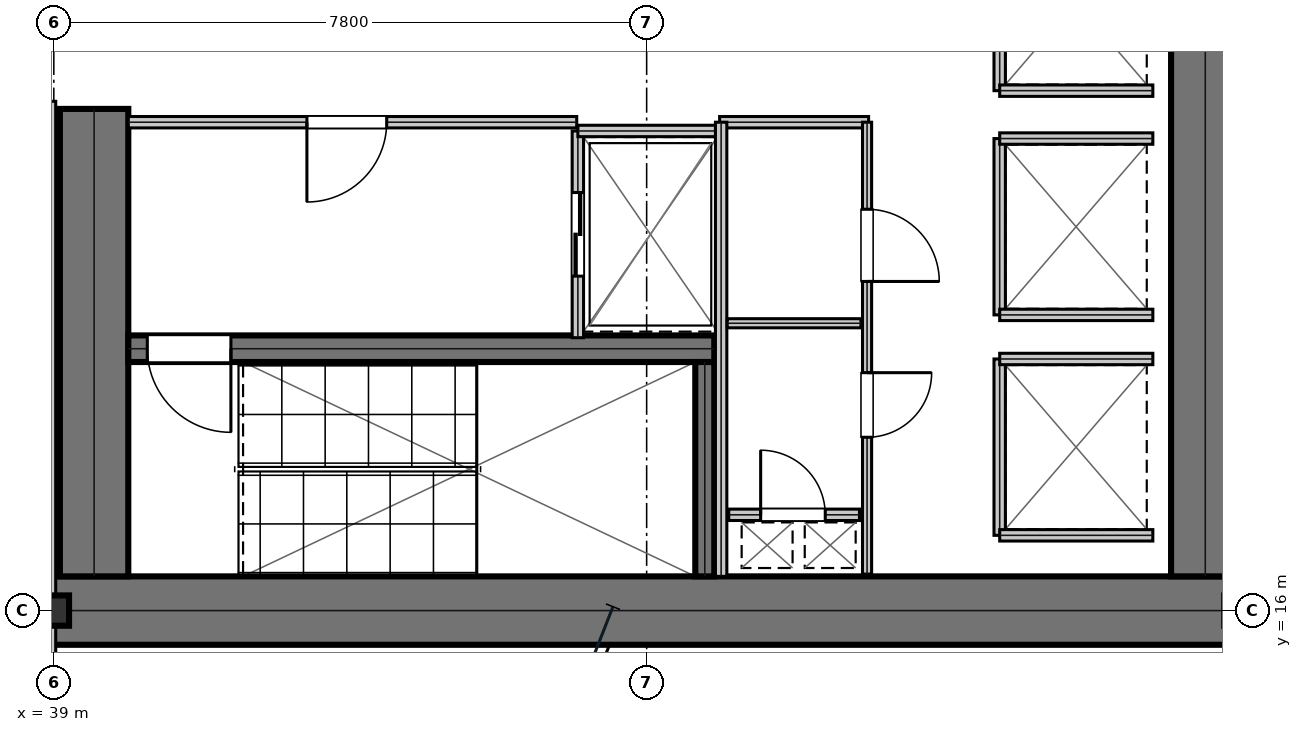
"""IFC4 building model, lengths in metres.
Left out: names, types, materials, properties, quantities, classifications, styles, units other than length and angle.
Written with IfcOpenShell. Run it as: python <this file> out.ifc"""

import sys

from ifc_helpers import new_model, si_unit, direction, frame, frame_2d, origin, origin_2d, place, context, subcontext, project, spatial, rectangle, i_section, extrude, element, fill, save


model = new_model("IFC4")
c1 = context("Model", 3, precision=1e-05, world=origin(), true_north=direction((0.0, 1.0)))
c2 = subcontext(c1, "Body", "Model", "MODEL_VIEW")
j1 = project(units=[si_unit("LENGTHUNIT", "METRE"), si_unit("PLANEANGLEUNIT", "RADIAN")], contexts=[c1])
p1 = place(None, origin())
s1 = spatial("IfcSite", under=j1, at=p1, CompositionType="ELEMENT")
p2 = place(p1, origin())
s2 = spatial("IfcBuilding", under=s1, at=p2, CompositionType="ELEMENT")
p3 = place(p2, frame((0.0, 0.0, 54.0)))
s3 = spatial("IfcBuildingStorey", under=s2, at=p3, CompositionType="ELEMENT", Elevation=54.0)
p4 = place(p3, frame((38.8, 16.0, 0.0), z_axis=(0.0, 0.0, 1.0), x_axis=(1.0, 0.0, 0.0)))
e1 = element("IfcWall", 1, at=p4, inside=s3, PredefinedType="SHEAR", context=c2, shape_type="SweptSolid", body=[
    extrude(rectangle(XDim=16.0, YDim=0.9, at=frame_2d((8.0, 0.0))), origin(), (0.0, 0.0, 1.0), 3.81),
])
p5 = place(p3, frame((39.53, 16.45, 0.0), z_axis=(0.0, 0.0, 1.0), x_axis=(0.0, 1.0, 0.0)))
e2 = element("IfcWall", 2, at=p5, inside=s3, PredefinedType="SHEAR", context=c2, shape_type="SweptSolid", body=[
    extrude(rectangle(XDim=6.15, YDim=0.9, at=frame_2d((3.075, 0.0))), origin(), (0.0, 0.0, 1.0), 3.81),
])
p6 = place(p3, frame((54.15, 16.45, 0.0), z_axis=(0.0, 0.0, 1.0), x_axis=(0.0, 1.0, 0.0)))
e3 = element("IfcWall", 3, at=p6, inside=s3, PredefinedType="SHEAR", context=c2, shape_type="SweptSolid", body=[
    extrude(rectangle(XDim=15.1, YDim=0.9, at=frame_2d((7.55, 0.0))), origin(), (0.0, 0.0, 1.0), 3.81),
])
p7 = place(p3, frame((39.98, 19.445, 0.0), z_axis=(0.0, 0.0, 1.0), x_axis=(1.0, 0.0, 0.0)))
e4 = element("IfcWall", 4, at=p7, inside=s3, PredefinedType="SHEAR", context=c2, shape_type="SweptSolid", body=[
    extrude(rectangle(XDim=7.71, YDim=0.35, at=frame_2d((3.855, 0.0))), origin(), (0.0, 0.0, 1.0), 3.81),
])
p8 = place(p7, frame((0.25, 0.0, 0.0)))
e5 = element("IfcOpeningElement", 5, at=p8, cuts=e4, PredefinedType="OPENING", context=c2, shape_type="SweptSolid", body=[
    extrude(rectangle(XDim=1.1, YDim=2.15, at=frame_2d((0.55, 1.075))), frame((0.0, 0.185, 0.0), z_axis=(0.0, -1.0, 0.0), x_axis=(1.0, 0.0, 0.0)), (0.0, 0.0, 1.0), 0.37),
])
p9 = place(p3, frame((47.565, 16.45, 0.0), z_axis=(0.0, 0.0, 1.0), x_axis=(0.0, 1.0, 0.0)))
e6 = element("IfcWall", 6, at=p9, inside=s3, PredefinedType="SHEAR", context=c2, shape_type="SweptSolid", body=[
    extrude(rectangle(XDim=2.82, YDim=0.25, at=frame_2d((1.41, 0.0))), origin(), (0.0, 0.0, 1.0), 3.81),
])
p10 = place(p3, frame((39.0, 16.0, 0.0), z_axis=(0.0, 0.0, 1.0), x_axis=(1.0, 0.0, 0.0)))
e7 = element("IfcColumn", 7, at=p10, inside=s3, PredefinedType="COLUMN", context=c2, shape_type="SweptSolid", body=[
    extrude(i_section(OverallWidth=0.401, OverallDepth=0.399, WebThickness=0.025, FlangeThickness=0.04, at=origin_2d()), origin(), (0.0, 0.0, 1.0), 4.044),
])
p11 = place(p3, frame((39.98, 22.425, 0.0), z_axis=(0.0, 0.0, 1.0), x_axis=(1.0, 0.0, 0.0)))
e8 = element("IfcWall", 8, at=p11, inside=s3, PredefinedType="PARTITIONING", context=c2, shape_type="SweptSolid", body=[
    extrude(rectangle(XDim=5.9, YDim=0.15, at=frame_2d((2.95, 0.0))), origin(), (0.0, 0.0, 1.0), 3.81),
])
p12 = place(p11, frame((2.35, 0.0, 0.0)))
e9 = element("IfcOpeningElement", 9, at=p12, cuts=e8, PredefinedType="OPENING", context=c2, shape_type="SweptSolid", body=[
    extrude(rectangle(XDim=1.05, YDim=2.15, at=frame_2d((0.525, 1.075))), frame((0.0, 0.085, 0.0), z_axis=(0.0, -1.0, 0.0), x_axis=(1.0, 0.0, 0.0)), (0.0, 0.0, 1.0), 0.17),
])
p13 = place(p3, frame((45.895, 19.59, 0.0), z_axis=(0.0, 0.0, 1.0), x_axis=(0.0, 1.0, 0.0)))
e10 = element("IfcWall", 10, at=p13, inside=s3, PredefinedType="PARTITIONING", context=c2, shape_type="SweptSolid", body=[
    extrude(rectangle(XDim=2.72, YDim=0.15, at=frame_2d((1.36, 0.0))), origin(), (0.0, 0.0, 1.0), 3.81),
])
p14 = place(p13, frame((0.81, 0.0, 0.0)))
e11 = element("IfcOpeningElement", 11, at=p14, cuts=e10, PredefinedType="OPENING", context=c2, shape_type="SweptSolid", body=[
    extrude(rectangle(XDim=1.1, YDim=2.15, at=frame_2d((0.55, 1.075))), frame((0.0, 0.085, 0.0), z_axis=(0.0, -1.0, 0.0), x_axis=(1.0, 0.0, 0.0)), (0.0, 0.0, 1.0), 0.17),
])
p15 = place(p3, frame((45.895, 22.31, 0.0), z_axis=(0.0, 0.0, 1.0), x_axis=(1.0, 0.0, 0.0)))
e12 = element("IfcWall", 12, at=p15, inside=s3, PredefinedType="PARTITIONING", context=c2, shape_type="SweptSolid", body=[
    extrude(rectangle(XDim=1.915, YDim=0.15, at=frame_2d((0.958, 0.0))), origin(), (0.0, 0.0, 1.0), 3.81),
])
p16 = place(p3, frame((51.445, 19.89, 0.0), z_axis=(0.0, 0.0, 1.0), x_axis=(0.0, 1.0, 0.0)))
e13 = element("IfcWall", 13, at=p16, inside=s3, PredefinedType="PARTITIONING", context=c2, shape_type="SweptSolid", body=[
    extrude(rectangle(XDim=2.32, YDim=0.15, at=frame_2d((1.16, 0.0))), origin(), (0.0, 0.0, 1.0), 3.81),
])
for number, where, z_axis, x_axis in (
    (14, (51.445, 19.89, 0.0), (0.0, 0.0, 1.0), (1.0, 0.0, 0.0)),
    (15, (51.445, 22.21, 0.0), (0.0, 0.0, 1.0), (1.0, 0.0, 0.0)),
):
    element("IfcWall", number, at=place(p3, frame(where, z_axis=z_axis, x_axis=x_axis)), inside=s3, PredefinedType="PARTITIONING", context=c2, shape_type="SweptSolid", body=[
        extrude(rectangle(XDim=2.015, YDim=0.15, at=frame_2d((1.007, 0.0))), origin(), (0.0, 0.0, 1.0), 3.81),
    ])
p17 = place(p3, frame((51.445, 22.84, 0.0), z_axis=(0.0, 0.0, 1.0), x_axis=(0.0, 1.0, 0.0)))
e16 = element("IfcWall", 16, at=p17, inside=s3, PredefinedType="PARTITIONING", context=c2, shape_type="SweptSolid", body=[
    extrude(rectangle(XDim=2.32, YDim=0.15, at=frame_2d((1.16, 0.0))), origin(), (0.0, 0.0, 1.0), 3.81),
])
p18 = place(p3, frame((51.445, 22.84, 0.0), z_axis=(0.0, 0.0, 1.0), x_axis=(1.0, 0.0, 0.0)))
e17 = element("IfcWall", 17, at=p18, inside=s3, PredefinedType="PARTITIONING", context=c2, shape_type="SweptSolid", body=[
    extrude(rectangle(XDim=2.015, YDim=0.15, at=frame_2d((1.007, 0.0))), origin(), (0.0, 0.0, 1.0), 3.81),
])
p19 = place(p3, frame((51.445, 16.99, 0.0), z_axis=(0.0, 0.0, 1.0), x_axis=(0.0, 1.0, 0.0)))
e18 = element("IfcWall", 18, at=p19, inside=s3, PredefinedType="PARTITIONING", context=c2, shape_type="SweptSolid", body=[
    extrude(rectangle(XDim=2.32, YDim=0.15, at=frame_2d((1.16, 0.0))), origin(), (0.0, 0.0, 1.0), 3.81),
])
for number, where, z_axis, x_axis in (
    (19, (51.445, 16.99, 0.0), (0.0, 0.0, 1.0), (1.0, 0.0, 0.0)),
    (20, (51.445, 19.31, 0.0), (0.0, 0.0, 1.0), (1.0, 0.0, 0.0)),
):
    element("IfcWall", number, at=place(p3, frame(where, z_axis=z_axis, x_axis=x_axis)), inside=s3, PredefinedType="PARTITIONING", context=c2, shape_type="SweptSolid", body=[
        extrude(rectangle(XDim=2.015, YDim=0.15, at=frame_2d((1.007, 0.0))), origin(), (0.0, 0.0, 1.0), 3.81),
    ])
p20 = place(p3, frame((47.88, 17.26, 0.0), z_axis=(0.0, 0.0, 1.0), x_axis=(1.0, 0.0, 0.0)))
e21 = element("IfcWall", 21, at=p20, inside=s3, PredefinedType="PARTITIONING", context=c2, shape_type="SweptSolid", body=[
    extrude(rectangle(XDim=1.72, YDim=0.15, at=frame_2d((0.86, 0.0))), origin(), (0.0, 0.0, 1.0), 3.81),
])
p21 = place(p20, frame((0.42, 0.0, 0.0)))
e22 = element("IfcOpeningElement", 22, at=p21, cuts=e21, PredefinedType="OPENING", context=c2, shape_type="SweptSolid", body=[
    extrude(rectangle(XDim=0.85, YDim=2.15, at=frame_2d((0.425, 1.075))), frame((0.0, 0.085, 0.0), z_axis=(0.0, -1.0, 0.0), x_axis=(1.0, 0.0, 0.0)), (0.0, 0.0, 1.0), 0.17),
])
p22 = place(p3, frame((47.76, 22.425, 0.0), z_axis=(0.0, 0.0, 1.0), x_axis=(1.0, 0.0, 0.0)))
e23 = element("IfcWall", 23, at=p22, inside=s3, PredefinedType="PARTITIONING", context=c2, shape_type="SweptSolid", body=[
    extrude(rectangle(XDim=1.96, YDim=0.15, at=frame_2d((0.98, 0.0))), origin(), (0.0, 0.0, 1.0), 3.81),
])
p23 = place(p3, frame((47.78, 16.45, 0.0), z_axis=(0.0, 0.0, 1.0), x_axis=(0.0, 1.0, 0.0)))
e24 = element("IfcWall", 24, at=p23, inside=s3, PredefinedType="PARTITIONING", context=c2, shape_type="SweptSolid", body=[
    extrude(rectangle(XDim=5.975, YDim=0.15, at=frame_2d((2.988, 0.0))), origin(), (0.0, 0.0, 1.0), 3.81),
])
p24 = place(p3, frame((47.86, 19.78, 0.0), z_axis=(0.0, 0.0, 1.0), x_axis=(1.0, 0.0, 0.0)))
e25 = element("IfcWall", 25, at=p24, inside=s3, PredefinedType="PARTITIONING", context=c2, shape_type="SweptSolid", body=[
    extrude(rectangle(XDim=1.76, YDim=0.12, at=frame_2d((0.88, 0.0))), origin(), (0.0, 0.0, 1.0), 3.81),
])
p25 = place(p3, frame((49.7, 16.48, 0.0), z_axis=(0.0, 0.0, 1.0), x_axis=(0.0, 1.0, 0.0)))
e26 = element("IfcWall", 26, at=p25, inside=s3, PredefinedType="PARTITIONING", context=c2, shape_type="SweptSolid", body=[
    extrude(rectangle(XDim=5.945, YDim=0.12, at=frame_2d((2.973, 0.0))), origin(), (0.0, 0.0, 1.0), 3.81),
])
p26 = place(p25, frame((1.8, 0.0, 0.0)))
e27 = element("IfcOpeningElement", 27, at=p26, cuts=e26, PredefinedType="OPENING", context=c2, shape_type="SweptSolid", body=[
    extrude(rectangle(XDim=0.85, YDim=2.15, at=frame_2d((0.425, 1.075))), frame((0.0, 0.07, 0.0), z_axis=(0.0, -1.0, 0.0), x_axis=(1.0, 0.0, 0.0)), (0.0, 0.0, 1.0), 0.14),
])
p27 = place(p25, frame((3.85, 0.0, 0.0)))
e28 = element("IfcOpeningElement", 28, at=p27, cuts=e26, PredefinedType="OPENING", context=c2, shape_type="SweptSolid", body=[
    extrude(rectangle(XDim=0.95, YDim=2.15, at=frame_2d((0.475, 1.075))), frame((0.0, 0.07, 0.0), z_axis=(0.0, -1.0, 0.0), x_axis=(1.0, 0.0, 0.0)), (0.0, 0.0, 1.0), 0.14),
])
p28 = place(p3, frame((38.95, 14.5, 0.0), z_axis=(0.0, 0.0, 1.0), x_axis=(0.0, 1.0, 0.0)))
e29 = element("IfcWall", 29, at=p28, inside=s3, PredefinedType="PARTITIONING", context=c2, shape_type="SweptSolid", body=[
    extrude(rectangle(XDim=8.2, YDim=0.15, at=frame_2d((4.1, 0.0))), origin(), (0.0, 0.0, 1.0), 3.181),
])
p29 = place(p12, frame((1.05, 0.0, 0.0), z_axis=(0.0, 0.0, 1.0), x_axis=(-1.0, 0.0, 0.0)))
e30 = element("IfcDoor", 30, at=p29, inside=s3, OperationType="SINGLE_SWING_RIGHT", PredefinedType="DOOR", context=c2, shape_type="SweptSolid", body=[
    extrude(rectangle(XDim=1.05, YDim=2.15, at=frame_2d((0.525, 1.075))), frame((0.0, 0.025, 0.0), z_axis=(0.0, -1.0, 0.0), x_axis=(1.0, 0.0, 0.0)), (0.0, 0.0, 1.0), 0.05),
])
fill(e9, e30)
p30 = place(p14, frame((1.1, 0.0, 0.0), z_axis=(0.0, 0.0, 1.0), x_axis=(-1.0, 0.0, 0.0)))
e31 = element("IfcDoor", 31, at=p30, inside=s3, OperationType="DOUBLE_DOOR_SLIDING", PredefinedType="DOOR", context=c2, shape_type="SweptSolid", body=[
    extrude(rectangle(XDim=1.1, YDim=2.15, at=frame_2d((0.55, 1.075))), frame((0.0, 0.025, 0.0), z_axis=(0.0, -1.0, 0.0), x_axis=(1.0, 0.0, 0.0)), (0.0, 0.0, 1.0), 0.05),
])
fill(e11, e31)
p31 = place(p21, origin())
e32 = element("IfcDoor", 32, at=p31, inside=s3, OperationType="SINGLE_SWING_LEFT", PredefinedType="TRAPDOOR", context=c2, shape_type="SweptSolid", body=[
    extrude(rectangle(XDim=0.85, YDim=2.15, at=frame_2d((0.425, 1.075))), frame((0.0, 0.025, 0.0), z_axis=(0.0, -1.0, 0.0), x_axis=(1.0, 0.0, 0.0)), (0.0, 0.0, 1.0), 0.05),
])
fill(e22, e32)
p32 = place(p26, frame((0.85, 0.0, 0.0), z_axis=(0.0, 0.0, 1.0), x_axis=(-1.0, 0.0, 0.0)))
e33 = element("IfcDoor", 33, at=p32, inside=s3, OperationType="SINGLE_SWING_LEFT", PredefinedType="DOOR", context=c2, shape_type="SweptSolid", body=[
    extrude(rectangle(XDim=0.85, YDim=2.15, at=frame_2d((0.425, 1.075))), frame((0.0, 0.025, 0.0), z_axis=(0.0, -1.0, 0.0), x_axis=(1.0, 0.0, 0.0)), (0.0, 0.0, 1.0), 0.05),
])
fill(e27, e33)
p33 = place(p27, frame((0.95, 0.0, 0.0), z_axis=(0.0, 0.0, 1.0), x_axis=(-1.0, 0.0, 0.0)))
e34 = element("IfcDoor", 34, at=p33, inside=s3, OperationType="SINGLE_SWING_RIGHT", PredefinedType="DOOR", context=c2, shape_type="SweptSolid", body=[
    extrude(rectangle(XDim=0.95, YDim=2.15, at=frame_2d((0.475, 1.075))), frame((0.0, 0.025, 0.0), z_axis=(0.0, -1.0, 0.0), x_axis=(1.0, 0.0, 0.0)), (0.0, 0.0, 1.0), 0.05),
])
fill(e28, e34)
p34 = place(p8, frame((1.1, 0.0, 0.0), z_axis=(0.0, 0.0, 1.0), x_axis=(-1.0, 0.0, 0.0)))
e35 = element("IfcDoor", 35, at=p34, inside=s3, OperationType="SINGLE_SWING_LEFT", PredefinedType="DOOR", context=c2, shape_type="SweptSolid", body=[
    extrude(rectangle(XDim=1.1, YDim=2.15, at=frame_2d((0.55, 1.075))), frame((0.0, 0.025, 0.0), z_axis=(0.0, -1.0, 0.0), x_axis=(1.0, 0.0, 0.0)), (0.0, 0.0, 1.0), 0.05),
])
fill(e5, e35)
save(model, sys.argv[1])
